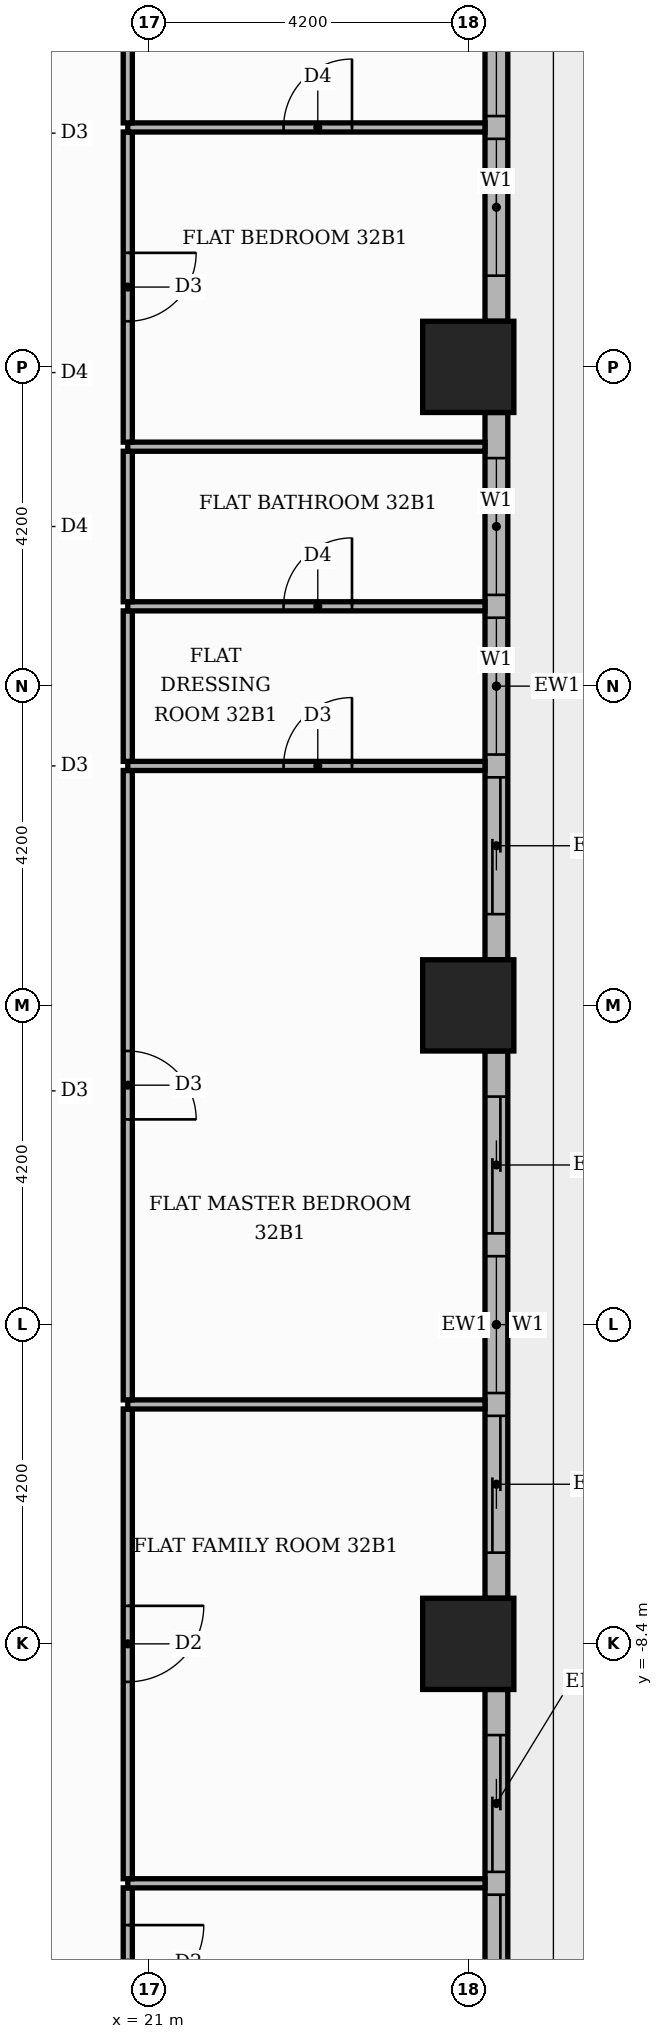
"""IFC4 building model, lengths in metres.
Left out: names, types, materials, properties, quantities, classifications, styles, units other than length and angle.
Written with IfcOpenShell. Run it as: python <this file> out.ifc"""

import sys

from ifc_helpers import new_model, si_unit, direction, frame, frame_2d, origin, origin_2d, place, context, subcontext, project, spatial, rectangle, extrude, element, fill, save


model = new_model("IFC4")
c1 = context("Model", 3, precision=1e-05, world=origin(), true_north=direction((0.0, 1.0)))
c2 = subcontext(c1, "Body", "Model", "MODEL_VIEW")
j1 = project(units=[si_unit("LENGTHUNIT", "METRE"), si_unit("PLANEANGLEUNIT", "RADIAN")], contexts=[c1])
p1 = place(None, origin())
s1 = spatial("IfcSite", under=j1, at=p1, CompositionType="ELEMENT")
p2 = place(p1, origin())
s2 = spatial("IfcBuilding", under=s1, at=p2, CompositionType="ELEMENT")
p3 = place(p2, frame((0.0, 0.0, 137.7)))
s3 = spatial("IfcBuildingStorey", under=s2, at=p3, CompositionType="ELEMENT", Elevation=137.7)
for number, where, z_axis, x_axis in (
    (1, (25.2, 0.0, 0.0), (0.0, 0.0, 1.0), (1.0, 0.0, 0.0)),
    (2, (25.2, 8.4, 0.0), (0.0, 0.0, 1.0), (1.0, 0.0, 0.0)),
    (3, (25.2, -8.4, 0.0), (0.0, 0.0, 1.0), (1.0, 0.0, 0.0)),
):
    element("IfcColumn", number, at=place(p3, frame(where, z_axis=z_axis, x_axis=x_axis)), inside=s3, PredefinedType="COLUMN", context=c2, shape_type="SweptSolid", body=[
        extrude(rectangle(XDim=1.2, YDim=1.2, at=origin_2d()), origin(), (0.0, 0.0, 1.0), 3.9),
    ])
p4 = place(p3, frame((25.57, -16.2, 0.0), z_axis=(0.0, 0.0, 1.0), x_axis=(0.0, 1.0, 0.0)))
e4 = element("IfcWall", 4, at=p4, inside=s3, PredefinedType="STANDARD", context=c2, shape_type="SweptSolid", body=[
    extrude(rectangle(XDim=7.2, YDim=0.3, at=frame_2d((3.6, 0.0))), origin(), (0.0, 0.0, 1.0), 3.48),
])
p5 = place(p4, frame((0.6, 0.0, 0.0)))
e5 = element("IfcOpeningElement", 5, at=p5, cuts=e4, PredefinedType="OPENING", context=c2, shape_type="SweptSolid", body=[
    extrude(rectangle(XDim=3.9, YDim=2.4, at=frame_2d((1.95, 1.2))), frame((0.0, 0.16, 0.0), z_axis=(0.0, -1.0, 0.0), x_axis=(1.0, 0.0, 0.0)), (0.0, 0.0, 1.0), 0.32),
])
p6 = place(p4, frame((4.8, 0.0, 0.0)))
e6 = element("IfcOpeningElement", 6, at=p6, cuts=e4, PredefinedType="OPENING", context=c2, shape_type="SweptSolid", body=[
    extrude(rectangle(XDim=1.8, YDim=2.4, at=frame_2d((0.9, 1.2))), frame((0.0, 0.16, 0.0), z_axis=(0.0, -1.0, 0.0), x_axis=(1.0, 0.0, 0.0)), (0.0, 0.0, 1.0), 0.32),
])
p7 = place(p3, frame((25.57, -7.8, 0.0), z_axis=(0.0, 0.0, 1.0), x_axis=(0.0, 1.0, 0.0)))
e7 = element("IfcWall", 7, at=p7, inside=s3, PredefinedType="STANDARD", context=c2, shape_type="SweptSolid", body=[
    extrude(rectangle(XDim=7.2, YDim=0.3, at=frame_2d((3.6, 0.0))), origin(), (0.0, 0.0, 1.0), 3.48),
])
p8 = place(p7, frame((0.6, 0.0, 0.0)))
e8 = element("IfcOpeningElement", 8, at=p8, cuts=e7, PredefinedType="OPENING", context=c2, shape_type="SweptSolid", body=[
    extrude(rectangle(XDim=1.8, YDim=2.4, at=frame_2d((0.9, 1.2))), frame((0.0, 0.16, 0.0), z_axis=(0.0, -1.0, 0.0), x_axis=(1.0, 0.0, 0.0)), (0.0, 0.0, 1.0), 0.32),
])
p9 = place(p7, frame((2.7, 0.0, 0.9)))
e9 = element("IfcOpeningElement", 9, at=p9, cuts=e7, PredefinedType="OPENING", context=c2, shape_type="SweptSolid", body=[
    extrude(rectangle(XDim=1.8, YDim=2.1, at=frame_2d((0.9, 1.05))), frame((0.0, 0.16, 0.0), z_axis=(0.0, -1.0, 0.0), x_axis=(1.0, 0.0, 0.0)), (0.0, 0.0, 1.0), 0.32),
])
p10 = place(p7, frame((4.8, 0.0, 0.0)))
e10 = element("IfcOpeningElement", 10, at=p10, cuts=e7, PredefinedType="OPENING", context=c2, shape_type="SweptSolid", body=[
    extrude(rectangle(XDim=1.8, YDim=2.4, at=frame_2d((0.9, 1.2))), frame((0.0, 0.16, 0.0), z_axis=(0.0, -1.0, 0.0), x_axis=(1.0, 0.0, 0.0)), (0.0, 0.0, 1.0), 0.32),
])
p11 = place(p3, frame((25.57, 0.6, 0.0), z_axis=(0.0, 0.0, 1.0), x_axis=(0.0, 1.0, 0.0)))
e11 = element("IfcWall", 11, at=p11, inside=s3, PredefinedType="STANDARD", context=c2, shape_type="SweptSolid", body=[
    extrude(rectangle(XDim=7.2, YDim=0.3, at=frame_2d((3.6, 0.0))), origin(), (0.0, 0.0, 1.0), 3.48),
])
p12 = place(p11, frame((0.6, 0.0, 0.0)))
e12 = element("IfcOpeningElement", 12, at=p12, cuts=e11, PredefinedType="OPENING", context=c2, shape_type="SweptSolid", body=[
    extrude(rectangle(XDim=1.8, YDim=2.4, at=frame_2d((0.9, 1.2))), frame((0.0, 0.16, 0.0), z_axis=(0.0, -1.0, 0.0), x_axis=(1.0, 0.0, 0.0)), (0.0, 0.0, 1.0), 0.32),
])
p13 = place(p11, frame((2.7, 0.0, 0.9)))
e13 = element("IfcOpeningElement", 13, at=p13, cuts=e11, PredefinedType="OPENING", context=c2, shape_type="SweptSolid", body=[
    extrude(rectangle(XDim=1.8, YDim=2.1, at=frame_2d((0.9, 1.05))), frame((0.0, 0.16, 0.0), z_axis=(0.0, -1.0, 0.0), x_axis=(1.0, 0.0, 0.0)), (0.0, 0.0, 1.0), 0.32),
])
p14 = place(p11, frame((4.8, 0.0, 0.9)))
e14 = element("IfcOpeningElement", 14, at=p14, cuts=e11, PredefinedType="OPENING", context=c2, shape_type="SweptSolid", body=[
    extrude(rectangle(XDim=1.8, YDim=2.1, at=frame_2d((0.9, 1.05))), frame((0.0, 0.16, 0.0), z_axis=(0.0, -1.0, 0.0), x_axis=(1.0, 0.0, 0.0)), (0.0, 0.0, 1.0), 0.32),
])
p15 = place(p3, frame((25.57, 9.0, 0.0), z_axis=(0.0, 0.0, 1.0), x_axis=(0.0, 1.0, 0.0)))
e15 = element("IfcWall", 15, at=p15, inside=s3, PredefinedType="STANDARD", context=c2, shape_type="SweptSolid", body=[
    extrude(rectangle(XDim=7.2, YDim=0.3, at=frame_2d((3.6, 0.0))), origin(), (0.0, 0.0, 1.0), 3.48),
])
p16 = place(p15, frame((0.6, 0.0, 0.9)))
e16 = element("IfcOpeningElement", 16, at=p16, cuts=e15, PredefinedType="OPENING", context=c2, shape_type="SweptSolid", body=[
    extrude(rectangle(XDim=1.8, YDim=2.1, at=frame_2d((0.9, 1.05))), frame((0.0, 0.16, 0.0), z_axis=(0.0, -1.0, 0.0), x_axis=(1.0, 0.0, 0.0)), (0.0, 0.0, 1.0), 0.32),
])
p17 = place(p15, frame((2.7, 0.0, 0.9)))
e17 = element("IfcOpeningElement", 17, at=p17, cuts=e15, PredefinedType="OPENING", context=c2, shape_type="SweptSolid", body=[
    extrude(rectangle(XDim=1.8, YDim=2.1, at=frame_2d((0.9, 1.05))), frame((0.0, 0.16, 0.0), z_axis=(0.0, -1.0, 0.0), x_axis=(1.0, 0.0, 0.0)), (0.0, 0.0, 1.0), 0.32),
])
p18 = place(p15, frame((4.8, 0.0, 0.9)))
e18 = element("IfcOpeningElement", 18, at=p18, cuts=e15, PredefinedType="OPENING", context=c2, shape_type="SweptSolid", body=[
    extrude(rectangle(XDim=1.8, YDim=2.1, at=frame_2d((0.9, 1.05))), frame((0.0, 0.16, 0.0), z_axis=(0.0, -1.0, 0.0), x_axis=(1.0, 0.0, 0.0)), (0.0, 0.0, 1.0), 0.32),
])
p19 = place(p3, frame((20.72, -13.59, 0.0), z_axis=(0.0, 0.0, 1.0), x_axis=(0.0, 1.0, 0.0)))
e19 = element("IfcWall", 19, at=p19, inside=s3, PredefinedType="PARTITIONING", context=c2, shape_type="SweptSolid", body=[
    extrude(rectangle(XDim=1.98, YDim=0.12, at=frame_2d((0.99, 0.0))), origin(), (0.0, 0.0, 1.0), 3.48),
])
p20 = place(p19, frame((0.49, 0.0, 0.0)))
e20 = element("IfcOpeningElement", 20, at=p20, cuts=e19, PredefinedType="OPENING", context=c2, shape_type="SweptSolid", body=[
    extrude(rectangle(XDim=1.0, YDim=2.1, at=frame_2d((0.5, 1.05))), frame((0.0, 0.07, 0.0), z_axis=(0.0, -1.0, 0.0), x_axis=(1.0, 0.0, 0.0)), (0.0, 0.0, 1.0), 0.14),
])
p21 = place(p3, frame((20.72, -11.55, 0.0), z_axis=(0.0, 0.0, 1.0), x_axis=(1.0, 0.0, 0.0)))
e21 = element("IfcWall", 21, at=p21, inside=s3, PredefinedType="PARTITIONING", context=c2, shape_type="SweptSolid", body=[
    extrude(rectangle(XDim=4.7, YDim=0.12, at=frame_2d((2.35, 0.0))), origin(), (0.0, 0.0, 1.0), 3.48),
])
p22 = place(p3, frame((20.72, -11.49, 0.0), z_axis=(0.0, 0.0, 1.0), x_axis=(0.0, 1.0, 0.0)))
e22 = element("IfcWall", 22, at=p22, inside=s3, PredefinedType="PARTITIONING", context=c2, shape_type="SweptSolid", body=[
    extrude(rectangle(XDim=6.18, YDim=0.12, at=frame_2d((3.09, 0.0))), origin(), (0.0, 0.0, 1.0), 3.48),
])
p23 = place(p22, frame((2.59, 0.0, 0.0)))
e23 = element("IfcOpeningElement", 23, at=p23, cuts=e22, PredefinedType="OPENING", context=c2, shape_type="SweptSolid", body=[
    extrude(rectangle(XDim=1.0, YDim=2.1, at=frame_2d((0.5, 1.05))), frame((0.0, 0.07, 0.0), z_axis=(0.0, -1.0, 0.0), x_axis=(1.0, 0.0, 0.0)), (0.0, 0.0, 1.0), 0.14),
])
p24 = place(p3, frame((20.72, -5.25, 0.0), z_axis=(0.0, 0.0, 1.0), x_axis=(1.0, 0.0, 0.0)))
e24 = element("IfcWall", 24, at=p24, inside=s3, PredefinedType="PARTITIONING", context=c2, shape_type="SweptSolid", body=[
    extrude(rectangle(XDim=4.7, YDim=0.12, at=frame_2d((2.35, 0.0))), origin(), (0.0, 0.0, 1.0), 3.48),
])
p25 = place(p3, frame((20.72, -5.19, 0.0), z_axis=(0.0, 0.0, 1.0), x_axis=(0.0, 1.0, 0.0)))
e25 = element("IfcWall", 25, at=p25, inside=s3, PredefinedType="PARTITIONING", context=c2, shape_type="SweptSolid", body=[
    extrude(rectangle(XDim=8.28, YDim=0.12, at=frame_2d((4.14, 0.0))), origin(), (0.0, 0.0, 1.0), 3.48),
])
p26 = place(p25, frame((3.69, 0.0, 0.0)))
e26 = element("IfcOpeningElement", 26, at=p26, cuts=e25, PredefinedType="OPENING", context=c2, shape_type="SweptSolid", body=[
    extrude(rectangle(XDim=0.9, YDim=2.1, at=frame_2d((0.45, 1.05))), frame((0.0, 0.07, 0.0), z_axis=(0.0, -1.0, 0.0), x_axis=(1.0, 0.0, 0.0)), (0.0, 0.0, 1.0), 0.14),
])
p27 = place(p3, frame((20.72, 3.15, 0.0), z_axis=(0.0, 0.0, 1.0), x_axis=(1.0, 0.0, 0.0)))
e27 = element("IfcWall", 27, at=p27, inside=s3, PredefinedType="PARTITIONING", context=c2, shape_type="SweptSolid", body=[
    extrude(rectangle(XDim=4.7, YDim=0.12, at=frame_2d((2.35, 0.0))), origin(), (0.0, 0.0, 1.0), 3.48),
])
p28 = place(p27, frame((2.05, 0.0, 0.0)))
e28 = element("IfcOpeningElement", 28, at=p28, cuts=e27, PredefinedType="OPENING", context=c2, shape_type="SweptSolid", body=[
    extrude(rectangle(XDim=0.9, YDim=2.1, at=frame_2d((0.45, 1.05))), frame((0.0, 0.07, 0.0), z_axis=(0.0, -1.0, 0.0), x_axis=(1.0, 0.0, 0.0)), (0.0, 0.0, 1.0), 0.14),
])
p29 = place(p3, frame((20.72, 3.21, 0.0), z_axis=(0.0, 0.0, 1.0), x_axis=(0.0, 1.0, 0.0)))
e29 = element("IfcWall", 29, at=p29, inside=s3, PredefinedType="PARTITIONING", context=c2, shape_type="SweptSolid", body=[
    extrude(rectangle(XDim=1.98, YDim=0.12, at=frame_2d((0.99, 0.0))), origin(), (0.0, 0.0, 1.0), 3.48),
])
p30 = place(p3, frame((20.72, 5.25, 0.0), z_axis=(0.0, 0.0, 1.0), x_axis=(1.0, 0.0, 0.0)))
e30 = element("IfcWall", 30, at=p30, inside=s3, PredefinedType="PARTITIONING", context=c2, shape_type="SweptSolid", body=[
    extrude(rectangle(XDim=4.7, YDim=0.12, at=frame_2d((2.35, 0.0))), origin(), (0.0, 0.0, 1.0), 3.48),
])
p31 = place(p30, frame((2.05, 0.0, 0.0)))
e31 = element("IfcOpeningElement", 31, at=p31, cuts=e30, PredefinedType="OPENING", context=c2, shape_type="SweptSolid", body=[
    extrude(rectangle(XDim=0.9, YDim=2.1, at=frame_2d((0.45, 1.05))), frame((0.0, 0.07, 0.0), z_axis=(0.0, -1.0, 0.0), x_axis=(1.0, 0.0, 0.0)), (0.0, 0.0, 1.0), 0.14),
])
p32 = place(p3, frame((20.72, 5.31, 0.0), z_axis=(0.0, 0.0, 1.0), x_axis=(0.0, 1.0, 0.0)))
e32 = element("IfcWall", 32, at=p32, inside=s3, PredefinedType="PARTITIONING", context=c2, shape_type="SweptSolid", body=[
    extrude(rectangle(XDim=1.98, YDim=0.12, at=frame_2d((0.99, 0.0))), origin(), (0.0, 0.0, 1.0), 3.48),
])
p33 = place(p3, frame((20.72, 7.35, 0.0), z_axis=(0.0, 0.0, 1.0), x_axis=(1.0, 0.0, 0.0)))
e33 = element("IfcWall", 33, at=p33, inside=s3, PredefinedType="PARTITIONING", context=c2, shape_type="SweptSolid", body=[
    extrude(rectangle(XDim=4.7, YDim=0.12, at=frame_2d((2.35, 0.0))), origin(), (0.0, 0.0, 1.0), 3.48),
])
p34 = place(p3, frame((20.72, 7.41, 0.0), z_axis=(0.0, 0.0, 1.0), x_axis=(0.0, 1.0, 0.0)))
e34 = element("IfcWall", 34, at=p34, inside=s3, PredefinedType="PARTITIONING", context=c2, shape_type="SweptSolid", body=[
    extrude(rectangle(XDim=4.08, YDim=0.12, at=frame_2d((2.04, 0.0))), origin(), (0.0, 0.0, 1.0), 3.48),
])
p35 = place(p34, frame((1.59, 0.0, 0.0)))
e35 = element("IfcOpeningElement", 35, at=p35, cuts=e34, PredefinedType="OPENING", context=c2, shape_type="SweptSolid", body=[
    extrude(rectangle(XDim=0.9, YDim=2.1, at=frame_2d((0.45, 1.05))), frame((0.0, 0.07, 0.0), z_axis=(0.0, -1.0, 0.0), x_axis=(1.0, 0.0, 0.0)), (0.0, 0.0, 1.0), 0.14),
])
p36 = place(p3, frame((20.72, 11.55, 0.0), z_axis=(0.0, 0.0, 1.0), x_axis=(1.0, 0.0, 0.0)))
e36 = element("IfcWall", 36, at=p36, inside=s3, PredefinedType="PARTITIONING", context=c2, shape_type="SweptSolid", body=[
    extrude(rectangle(XDim=4.7, YDim=0.12, at=frame_2d((2.35, 0.0))), origin(), (0.0, 0.0, 1.0), 3.48),
])
p37 = place(p36, frame((2.05, 0.0, 0.0)))
e37 = element("IfcOpeningElement", 37, at=p37, cuts=e36, PredefinedType="OPENING", context=c2, shape_type="SweptSolid", body=[
    extrude(rectangle(XDim=0.9, YDim=2.1, at=frame_2d((0.45, 1.05))), frame((0.0, 0.07, 0.0), z_axis=(0.0, -1.0, 0.0), x_axis=(1.0, 0.0, 0.0)), (0.0, 0.0, 1.0), 0.14),
])
p38 = place(p3, frame((20.72, 11.61, 0.0), z_axis=(0.0, 0.0, 1.0), x_axis=(0.0, 1.0, 0.0)))
e38 = element("IfcWall", 38, at=p38, inside=s3, PredefinedType="PARTITIONING", context=c2, shape_type="SweptSolid", body=[
    extrude(rectangle(XDim=1.94, YDim=0.12, at=frame_2d((0.97, 0.0))), origin(), (0.0, 0.0, 1.0), 3.48),
])
p39 = place(p5, origin())
e39 = element("IfcDoor", 39, at=p39, inside=s3, OperationType="SLIDING_TO_LEFT", PredefinedType="DOOR", context=c2, shape_type="SweptSolid", body=[
    extrude(rectangle(XDim=3.9, YDim=2.4, at=frame_2d((1.95, 1.2))), frame((0.0, 0.025, 0.0), z_axis=(0.0, -1.0, 0.0), x_axis=(1.0, 0.0, 0.0)), (0.0, 0.0, 1.0), 0.05),
])
fill(e5, e39)
p40 = place(p6, origin())
e40 = element("IfcDoor", 40, at=p40, inside=s3, OperationType="SLIDING_TO_RIGHT", PredefinedType="DOOR", context=c2, shape_type="SweptSolid", body=[
    extrude(rectangle(XDim=1.8, YDim=2.4, at=frame_2d((0.9, 1.2))), frame((0.0, 0.025, 0.0), z_axis=(0.0, -1.0, 0.0), x_axis=(1.0, 0.0, 0.0)), (0.0, 0.0, 1.0), 0.05),
])
fill(e6, e40)
p41 = place(p8, origin())
e41 = element("IfcDoor", 41, at=p41, inside=s3, OperationType="SLIDING_TO_LEFT", PredefinedType="DOOR", context=c2, shape_type="SweptSolid", body=[
    extrude(rectangle(XDim=1.8, YDim=2.4, at=frame_2d((0.9, 1.2))), frame((0.0, 0.025, 0.0), z_axis=(0.0, -1.0, 0.0), x_axis=(1.0, 0.0, 0.0)), (0.0, 0.0, 1.0), 0.05),
])
fill(e8, e41)
p42 = place(p9, origin())
e42 = element("IfcWindow", 42, at=p42, inside=s3, PartitioningType="SINGLE_PANEL", PredefinedType="WINDOW", context=c2, shape_type="SweptSolid", body=[
    extrude(rectangle(XDim=1.8, YDim=2.1, at=frame_2d((0.9, 1.05))), frame((0.0, 0.03, 0.0), z_axis=(0.0, -1.0, 0.0), x_axis=(1.0, 0.0, 0.0)), (0.0, 0.0, 1.0), 0.06),
])
fill(e9, e42)
p43 = place(p10, origin())
e43 = element("IfcDoor", 43, at=p43, inside=s3, OperationType="SLIDING_TO_RIGHT", PredefinedType="DOOR", context=c2, shape_type="SweptSolid", body=[
    extrude(rectangle(XDim=1.8, YDim=2.4, at=frame_2d((0.9, 1.2))), frame((0.0, 0.025, 0.0), z_axis=(0.0, -1.0, 0.0), x_axis=(1.0, 0.0, 0.0)), (0.0, 0.0, 1.0), 0.05),
])
fill(e10, e43)
p44 = place(p12, origin())
e44 = element("IfcDoor", 44, at=p44, inside=s3, OperationType="SLIDING_TO_LEFT", PredefinedType="DOOR", context=c2, shape_type="SweptSolid", body=[
    extrude(rectangle(XDim=1.8, YDim=2.4, at=frame_2d((0.9, 1.2))), frame((0.0, 0.025, 0.0), z_axis=(0.0, -1.0, 0.0), x_axis=(1.0, 0.0, 0.0)), (0.0, 0.0, 1.0), 0.05),
])
fill(e12, e44)
p45 = place(p13, origin())
e45 = element("IfcWindow", 45, at=p45, inside=s3, PartitioningType="SINGLE_PANEL", PredefinedType="WINDOW", context=c2, shape_type="SweptSolid", body=[
    extrude(rectangle(XDim=1.8, YDim=2.1, at=frame_2d((0.9, 1.05))), frame((0.0, 0.03, 0.0), z_axis=(0.0, -1.0, 0.0), x_axis=(1.0, 0.0, 0.0)), (0.0, 0.0, 1.0), 0.06),
])
fill(e13, e45)
p46 = place(p14, origin())
e46 = element("IfcWindow", 46, at=p46, inside=s3, PartitioningType="SINGLE_PANEL", PredefinedType="WINDOW", context=c2, shape_type="SweptSolid", body=[
    extrude(rectangle(XDim=1.8, YDim=2.1, at=frame_2d((0.9, 1.05))), frame((0.0, 0.03, 0.0), z_axis=(0.0, -1.0, 0.0), x_axis=(1.0, 0.0, 0.0)), (0.0, 0.0, 1.0), 0.06),
])
fill(e14, e46)
p47 = place(p16, origin())
e47 = element("IfcWindow", 47, at=p47, inside=s3, PartitioningType="SINGLE_PANEL", PredefinedType="WINDOW", context=c2, shape_type="SweptSolid", body=[
    extrude(rectangle(XDim=1.8, YDim=2.1, at=frame_2d((0.9, 1.05))), frame((0.0, 0.03, 0.0), z_axis=(0.0, -1.0, 0.0), x_axis=(1.0, 0.0, 0.0)), (0.0, 0.0, 1.0), 0.06),
])
fill(e16, e47)
p48 = place(p17, origin())
e48 = element("IfcWindow", 48, at=p48, inside=s3, PartitioningType="SINGLE_PANEL", PredefinedType="WINDOW", context=c2, shape_type="SweptSolid", body=[
    extrude(rectangle(XDim=1.8, YDim=2.1, at=frame_2d((0.9, 1.05))), frame((0.0, 0.03, 0.0), z_axis=(0.0, -1.0, 0.0), x_axis=(1.0, 0.0, 0.0)), (0.0, 0.0, 1.0), 0.06),
])
fill(e17, e48)
p49 = place(p20, frame((1.0, 0.0, 0.0), z_axis=(0.0, 0.0, 1.0), x_axis=(-1.0, 0.0, 0.0)))
e49 = element("IfcDoor", 49, at=p49, inside=s3, OperationType="SINGLE_SWING_RIGHT", PredefinedType="DOOR", context=c2, shape_type="SweptSolid", body=[
    extrude(rectangle(XDim=1.0, YDim=2.1, at=frame_2d((0.5, 1.05))), frame((0.0, 0.025, 0.0), z_axis=(0.0, -1.0, 0.0), x_axis=(1.0, 0.0, 0.0)), (0.0, 0.0, 1.0), 0.05),
])
fill(e20, e49)
p50 = place(p23, frame((1.0, 0.0, 0.0), z_axis=(0.0, 0.0, 1.0), x_axis=(-1.0, 0.0, 0.0)))
e50 = element("IfcDoor", 50, at=p50, inside=s3, OperationType="SINGLE_SWING_RIGHT", PredefinedType="DOOR", context=c2, shape_type="SweptSolid", body=[
    extrude(rectangle(XDim=1.0, YDim=2.1, at=frame_2d((0.5, 1.05))), frame((0.0, 0.025, 0.0), z_axis=(0.0, -1.0, 0.0), x_axis=(1.0, 0.0, 0.0)), (0.0, 0.0, 1.0), 0.05),
])
fill(e23, e50)
p51 = place(p26, frame((0.9, 0.0, 0.0), z_axis=(0.0, 0.0, 1.0), x_axis=(-1.0, 0.0, 0.0)))
e51 = element("IfcDoor", 51, at=p51, inside=s3, OperationType="SINGLE_SWING_LEFT", PredefinedType="DOOR", context=c2, shape_type="SweptSolid", body=[
    extrude(rectangle(XDim=0.9, YDim=2.1, at=frame_2d((0.45, 1.05))), frame((0.0, 0.025, 0.0), z_axis=(0.0, -1.0, 0.0), x_axis=(1.0, 0.0, 0.0)), (0.0, 0.0, 1.0), 0.05),
])
fill(e26, e51)
p52 = place(p28, origin())
e52 = element("IfcDoor", 52, at=p52, inside=s3, OperationType="SINGLE_SWING_RIGHT", PredefinedType="DOOR", context=c2, shape_type="SweptSolid", body=[
    extrude(rectangle(XDim=0.9, YDim=2.1, at=frame_2d((0.45, 1.05))), frame((0.0, 0.025, 0.0), z_axis=(0.0, -1.0, 0.0), x_axis=(1.0, 0.0, 0.0)), (0.0, 0.0, 1.0), 0.05),
])
fill(e28, e52)
p53 = place(p31, origin())
e53 = element("IfcDoor", 53, at=p53, inside=s3, OperationType="SINGLE_SWING_RIGHT", PredefinedType="DOOR", context=c2, shape_type="SweptSolid", body=[
    extrude(rectangle(XDim=0.9, YDim=2.1, at=frame_2d((0.45, 1.05))), frame((0.0, 0.025, 0.0), z_axis=(0.0, -1.0, 0.0), x_axis=(1.0, 0.0, 0.0)), (0.0, 0.0, 1.0), 0.05),
])
fill(e31, e53)
p54 = place(p35, frame((0.9, 0.0, 0.0), z_axis=(0.0, 0.0, 1.0), x_axis=(-1.0, 0.0, 0.0)))
e54 = element("IfcDoor", 54, at=p54, inside=s3, OperationType="SINGLE_SWING_RIGHT", PredefinedType="DOOR", context=c2, shape_type="SweptSolid", body=[
    extrude(rectangle(XDim=0.9, YDim=2.1, at=frame_2d((0.45, 1.05))), frame((0.0, 0.025, 0.0), z_axis=(0.0, -1.0, 0.0), x_axis=(1.0, 0.0, 0.0)), (0.0, 0.0, 1.0), 0.05),
])
fill(e35, e54)
p55 = place(p37, origin())
e55 = element("IfcDoor", 55, at=p55, inside=s3, OperationType="SINGLE_SWING_RIGHT", PredefinedType="DOOR", context=c2, shape_type="SweptSolid", body=[
    extrude(rectangle(XDim=0.9, YDim=2.1, at=frame_2d((0.45, 1.05))), frame((0.0, 0.025, 0.0), z_axis=(0.0, -1.0, 0.0), x_axis=(1.0, 0.0, 0.0)), (0.0, 0.0, 1.0), 0.05),
])
fill(e37, e55)
save(model, sys.argv[1])
